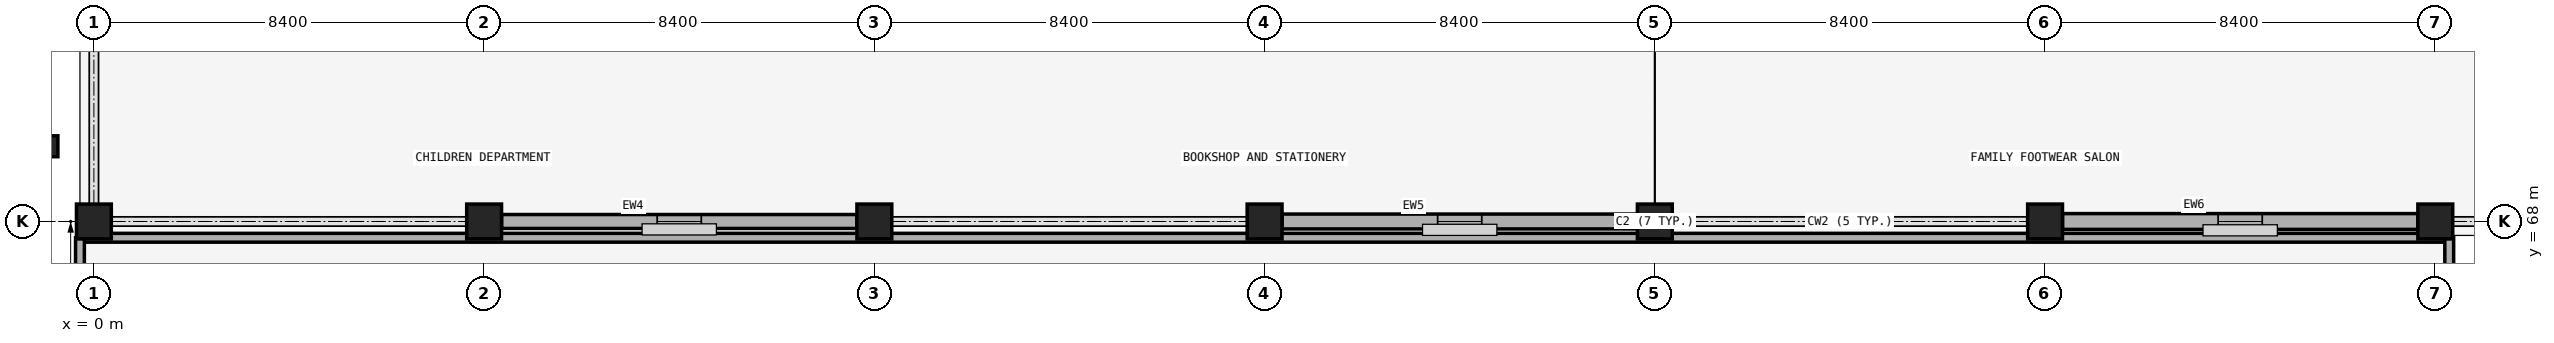
"""IFC4 building model, lengths in metres.
Left out: names, types, materials, properties, quantities, classifications, styles, units other than length and angle.
Written with IfcOpenShell. Run it as: python <this file> out.ifc"""

import sys

from ifc_helpers import new_model, si_unit, direction, frame, frame_2d, origin, origin_2d, place, context, subcontext, project, spatial, rectangle, extrude, element, fill, save


model = new_model("IFC4")
c1 = context("Model", 3, precision=1e-05, world=origin(), true_north=direction((0.0, 1.0)))
c2 = subcontext(c1, "Body", "Model", "MODEL_VIEW")
j1 = project(units=[si_unit("LENGTHUNIT", "METRE"), si_unit("PLANEANGLEUNIT", "RADIAN")], contexts=[c1])
p1 = place(None, origin())
s1 = spatial("IfcSite", under=j1, at=p1, CompositionType="ELEMENT")
p2 = place(p1, origin())
s2 = spatial("IfcBuilding", under=s1, at=p2, CompositionType="ELEMENT")
p3 = place(p2, frame((0.0, 0.0, 14.4)))
s3 = spatial("IfcBuildingStorey", under=s2, at=p3, CompositionType="ELEMENT", Elevation=14.4)
for number, where, z_axis, x_axis in (
    (1, (0.0, 68.0, 0.0), (0.0, 0.0, 1.0), (1.0, 0.0, 0.0)),
    (2, (8.4, 68.0, 0.0), (0.0, 0.0, 1.0), (1.0, 0.0, 0.0)),
    (3, (16.8, 68.0, 0.0), (0.0, 0.0, 1.0), (1.0, 0.0, 0.0)),
    (4, (25.2, 68.0, 0.0), (0.0, 0.0, 1.0), (1.0, 0.0, 0.0)),
    (5, (33.6, 68.0, 0.0), (0.0, 0.0, 1.0), (1.0, 0.0, 0.0)),
    (6, (42.0, 68.0, 0.0), (0.0, 0.0, 1.0), (1.0, 0.0, 0.0)),
    (7, (50.4, 68.0, 0.0), (0.0, 0.0, 1.0), (1.0, 0.0, 0.0)),
):
    element("IfcColumn", number, at=place(p3, frame(where, z_axis=z_axis, x_axis=x_axis)), inside=s3, PredefinedType="COLUMN", context=c2, shape_type="SweptSolid", body=[
        extrude(rectangle(XDim=0.75, YDim=0.75, at=origin_2d()), origin(), (0.0, 0.0, 1.0), 4.5),
    ])
p4 = place(p3, frame((-1.05, 69.62, 0.0), z_axis=(0.0, 0.0, 1.0), x_axis=(0.0, 1.0, 0.0)))
e8 = element("IfcColumn", 8, at=p4, inside=s3, PredefinedType="PILASTER", context=c2, shape_type="SweptSolid", body=[
    extrude(rectangle(XDim=0.45, YDim=0.55, at=origin_2d()), origin(), (0.0, 0.0, 1.0), 4.5),
])
p5 = place(p3, frame((8.775, 68.0, 0.0), z_axis=(0.0, 0.0, 1.0), x_axis=(1.0, 0.0, 0.0)))
e9 = element("IfcWall", 9, at=p5, inside=s3, PredefinedType="SOLIDWALL", context=c2, shape_type="SweptSolid", body=[
    extrude(rectangle(XDim=7.65, YDim=0.3, at=frame_2d((3.825, 0.0))), origin(), (0.0, 0.0, 1.0), 3.45),
])
p6 = place(p5, frame((3.35, 0.0, 0.95)))
e10 = element("IfcOpeningElement", 10, at=p6, cuts=e9, PredefinedType="OPENING", context=c2, shape_type="SweptSolid", body=[
    extrude(rectangle(XDim=0.95, YDim=1.35, at=frame_2d((0.475, 0.675))), frame((0.0, 0.16, 0.0), z_axis=(0.0, -1.0, 0.0), x_axis=(1.0, 0.0, 0.0)), (0.0, 0.0, 1.0), 0.32),
])
p7 = place(p3, frame((25.575, 68.0, 0.0), z_axis=(0.0, 0.0, 1.0), x_axis=(1.0, 0.0, 0.0)))
e11 = element("IfcWall", 11, at=p7, inside=s3, PredefinedType="SOLIDWALL", context=c2, shape_type="SweptSolid", body=[
    extrude(rectangle(XDim=7.65, YDim=0.32, at=frame_2d((3.825, 0.0))), origin(), (0.0, 0.0, 1.0), 3.45),
])
p8 = place(p7, frame((3.35, 0.0, 0.95)))
e12 = element("IfcOpeningElement", 12, at=p8, cuts=e11, PredefinedType="OPENING", context=c2, shape_type="SweptSolid", body=[
    extrude(rectangle(XDim=0.95, YDim=1.6, at=frame_2d((0.475, 0.8))), frame((0.0, 0.17, 0.0), z_axis=(0.0, -1.0, 0.0), x_axis=(1.0, 0.0, 0.0)), (0.0, 0.0, 1.0), 0.34),
])
p9 = place(p3, frame((42.375, 68.0, 0.0), z_axis=(0.0, 0.0, 1.0), x_axis=(1.0, 0.0, 0.0)))
e13 = element("IfcWall", 13, at=p9, inside=s3, PredefinedType="SOLIDWALL", context=c2, shape_type="SweptSolid", body=[
    extrude(rectangle(XDim=7.65, YDim=0.34, at=frame_2d((3.825, 0.0))), origin(), (0.0, 0.0, 1.0), 3.45),
])
p10 = place(p9, frame((3.35, 0.0, 0.95)))
e14 = element("IfcOpeningElement", 14, at=p10, cuts=e13, PredefinedType="OPENING", context=c2, shape_type="SweptSolid", body=[
    extrude(rectangle(XDim=0.95, YDim=1.85, at=frame_2d((0.475, 0.925))), frame((0.0, 0.18, 0.0), z_axis=(0.0, -1.0, 0.0), x_axis=(1.0, 0.0, 0.0)), (0.0, 0.0, 1.0), 0.36),
])
p11 = place(p3, frame((50.7, 67.65, 0.0), z_axis=(0.0, 0.0, 1.0), x_axis=(-1.0, 0.0, 0.0)))
e15 = element("IfcWall", 15, at=p11, inside=s3, PredefinedType="PARAPET", context=c2, shape_type="SweptSolid", body=[
    extrude(rectangle(XDim=51.0, YDim=0.19, at=frame_2d((25.5, 0.0))), origin(), (0.0, 0.0, 1.0), 0.95),
])
for number, where, z_axis, x_axis in (
    (16, (-0.3, 67.65, 0.0), (0.0, 0.0, 1.0), (0.0, -1.0, 0.0)),
    (17, (50.7, 59.3, 0.0), (0.0, 0.0, 1.0), (0.0, 1.0, 0.0)),
):
    element("IfcWall", number, at=place(p3, frame(where, z_axis=z_axis, x_axis=x_axis)), inside=s3, PredefinedType="PARAPET", context=c2, shape_type="SweptSolid", body=[
        extrude(rectangle(XDim=8.35, YDim=0.19, at=frame_2d((4.175, 0.0))), origin(), (0.0, 0.0, 1.0), 0.95),
    ])
p12 = place(p6, origin())
e18 = element("IfcWindow", 18, at=p12, inside=s3, PartitioningType="SINGLE_PANEL", PredefinedType="WINDOW", context=c2, shape_type="SweptSolid", body=[
    extrude(rectangle(XDim=0.95, YDim=1.35, at=frame_2d((0.475, 0.675))), frame((0.0, 0.03, 0.0), z_axis=(0.0, -1.0, 0.0), x_axis=(1.0, 0.0, 0.0)), (0.0, 0.0, 1.0), 0.06),
])
fill(e10, e18)
p13 = place(p8, origin())
e19 = element("IfcWindow", 19, at=p13, inside=s3, PartitioningType="SINGLE_PANEL", PredefinedType="WINDOW", context=c2, shape_type="SweptSolid", body=[
    extrude(rectangle(XDim=0.95, YDim=1.6, at=frame_2d((0.475, 0.8))), frame((0.0, 0.03, 0.0), z_axis=(0.0, -1.0, 0.0), x_axis=(1.0, 0.0, 0.0)), (0.0, 0.0, 1.0), 0.06),
])
fill(e12, e19)
p14 = place(p10, origin())
e20 = element("IfcWindow", 20, at=p14, inside=s3, PartitioningType="SINGLE_PANEL", PredefinedType="WINDOW", context=c2, shape_type="SweptSolid", body=[
    extrude(rectangle(XDim=0.95, YDim=1.85, at=frame_2d((0.475, 0.925))), frame((0.0, 0.03, 0.0), z_axis=(0.0, -1.0, 0.0), x_axis=(1.0, 0.0, 0.0)), (0.0, 0.0, 1.0), 0.06),
])
fill(e14, e20)
save(model, sys.argv[1])
